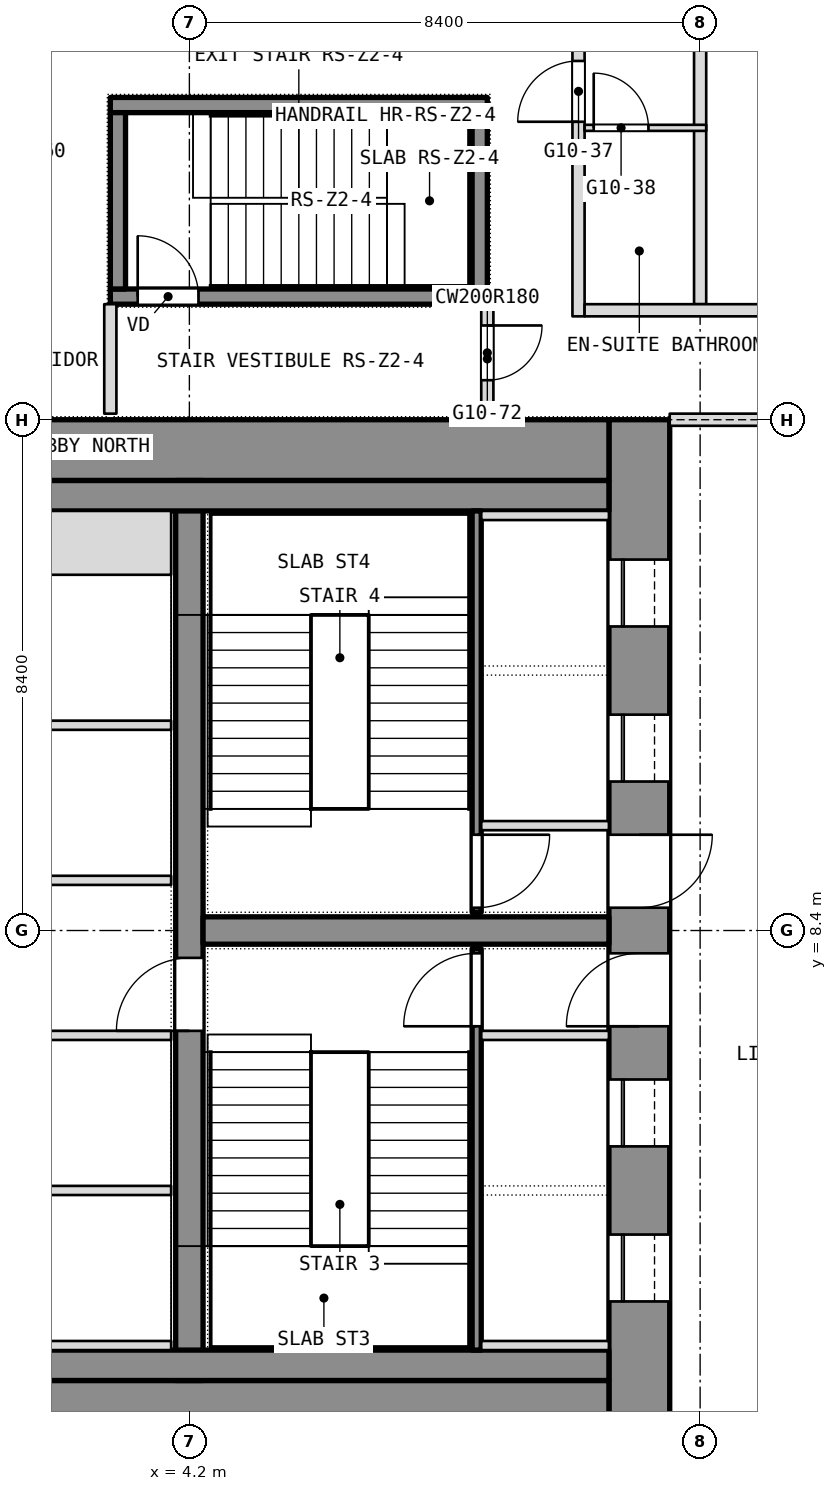
"""IFC4 building model, lengths in metres.
Left out: names, types, materials, properties, quantities, classifications, styles, units other than length and angle.
Written with IfcOpenShell. Run it as: python <this file> out.ifc"""

import sys

from ifc_helpers import new_model, si_unit, direction, frame, frame_2d, origin, place, context, subcontext, project, spatial, rectangle, extrude, element, fill, save


model = new_model("IFC4")
c1 = context("Model", 3, precision=1e-05, world=origin(), true_north=direction((0.0, 1.0)))
c2 = subcontext(c1, "Body", "Model", "MODEL_VIEW")
j1 = project(units=[si_unit("LENGTHUNIT", "METRE"), si_unit("PLANEANGLEUNIT", "RADIAN")], contexts=[c1])
p1 = place(None, origin())
s1 = spatial("IfcSite", under=j1, at=p1, CompositionType="ELEMENT")
p2 = place(p1, origin())
s2 = spatial("IfcBuilding", under=s1, at=p2, CompositionType="ELEMENT")
p3 = place(p2, frame((0.0, 0.0, 126.5)))
s3 = spatial("IfcBuildingStorey", under=s2, at=p3, CompositionType="ELEMENT", Elevation=126.5)
p4 = place(p3, frame((11.6, 0.0, 0.0), z_axis=(0.0, 0.0, 1.0), x_axis=(0.0, 1.0, 0.0)))
e1 = element("IfcWall", 1, at=p4, inside=s3, PredefinedType="SHEAR", context=c2, shape_type="SweptSolid", body=[
    extrude(rectangle(XDim=16.8, YDim=1.0, at=frame_2d((8.4, 0.0))), origin(), (0.0, 0.0, 1.0), 3.6),
])
p5 = place(p4, frame((2.3, 0.0, 0.0)))
e2 = element("IfcOpeningElement", 2, at=p5, cuts=e1, PredefinedType="OPENING", context=c2, shape_type="SweptSolid", body=[
    extrude(rectangle(XDim=1.1, YDim=2.1, at=frame_2d((0.55, 1.05))), frame((0.0, 0.5, 0.0), z_axis=(0.0, -1.0, 0.0), x_axis=(1.0, 0.0, 0.0)), (0.0, 0.0, 1.0), 1.0),
])
p6 = place(p4, frame((4.85, 0.0, 0.0)))
e3 = element("IfcOpeningElement", 3, at=p6, cuts=e1, PredefinedType="OPENING", context=c2, shape_type="SweptSolid", body=[
    extrude(rectangle(XDim=1.1, YDim=2.1, at=frame_2d((0.55, 1.05))), frame((0.0, 0.5, 0.0), z_axis=(0.0, -1.0, 0.0), x_axis=(1.0, 0.0, 0.0)), (0.0, 0.0, 1.0), 1.0),
])
p7 = place(p4, frame((6.825, 0.0, 0.0)))
e4 = element("IfcOpeningElement", 4, at=p7, cuts=e1, PredefinedType="OPENING", context=c2, shape_type="SweptSolid", body=[
    extrude(rectangle(XDim=1.2, YDim=2.1, at=frame_2d((0.6, 1.05))), frame((0.0, 0.5, 0.0), z_axis=(0.0, -1.0, 0.0), x_axis=(1.0, 0.0, 0.0)), (0.0, 0.0, 1.0), 1.0),
])
p8 = place(p4, frame((13.4, 0.0, 0.0)))
e5 = element("IfcOpeningElement", 5, at=p8, cuts=e1, PredefinedType="OPENING", context=c2, shape_type="SweptSolid", body=[
    extrude(rectangle(XDim=1.1, YDim=2.1, at=frame_2d((0.55, 1.05))), frame((0.0, 0.5, 0.0), z_axis=(0.0, -1.0, 0.0), x_axis=(1.0, 0.0, 0.0)), (0.0, 0.0, 1.0), 1.0),
])
p9 = place(p4, frame((10.85, 0.0, 0.0)))
e6 = element("IfcOpeningElement", 6, at=p9, cuts=e1, PredefinedType="OPENING", context=c2, shape_type="SweptSolid", body=[
    extrude(rectangle(XDim=1.1, YDim=2.1, at=frame_2d((0.55, 1.05))), frame((0.0, 0.5, 0.0), z_axis=(0.0, -1.0, 0.0), x_axis=(1.0, 0.0, 0.0)), (0.0, 0.0, 1.0), 1.0),
])
p10 = place(p4, frame((8.775, 0.0, 0.0)))
e7 = element("IfcOpeningElement", 7, at=p10, cuts=e1, PredefinedType="OPENING", context=c2, shape_type="SweptSolid", body=[
    extrude(rectangle(XDim=1.2, YDim=2.1, at=frame_2d((0.6, 1.05))), frame((0.0, 0.5, 0.0), z_axis=(0.0, -1.0, 0.0), x_axis=(1.0, 0.0, 0.0)), (0.0, 0.0, 1.0), 1.0),
])
for number, where, z_axis, x_axis in (
    (8, (-11.1, 0.5, 0.0), (0.0, 0.0, 1.0), (1.0, 0.0, 0.0)),
    (9, (-11.1, 16.3, 0.0), (0.0, 0.0, 1.0), (1.0, 0.0, 0.0)),
):
    element("IfcWall", number, at=place(p3, frame(where, z_axis=z_axis, x_axis=x_axis)), inside=s3, PredefinedType="SHEAR", context=c2, shape_type="SweptSolid", body=[
        extrude(rectangle(XDim=22.2, YDim=1.0, at=frame_2d((11.1, 0.0))), origin(), (0.0, 0.0, 1.0), 3.6),
    ])
p11 = place(p3, frame((4.2, 1.0, 0.0), z_axis=(0.0, 0.0, 1.0), x_axis=(0.0, 1.0, 0.0)))
e10 = element("IfcWall", 10, at=p11, inside=s3, PredefinedType="SHEAR", context=c2, shape_type="SweptSolid", body=[
    extrude(rectangle(XDim=14.8, YDim=0.45, at=frame_2d((7.4, 0.0))), origin(), (0.0, 0.0, 1.0), 3.6),
])
p12 = place(p11, frame((5.75, 0.0, 0.0)))
e11 = element("IfcOpeningElement", 11, at=p12, cuts=e10, PredefinedType="OPENING", context=c2, shape_type="SweptSolid", body=[
    extrude(rectangle(XDim=1.2, YDim=2.1, at=frame_2d((0.6, 1.05))), frame((0.0, 0.225, 0.0), z_axis=(0.0, -1.0, 0.0), x_axis=(1.0, 0.0, 0.0)), (0.0, 0.0, 1.0), 0.45),
])
p13 = place(p3, frame((4.425, 8.4, 0.0), z_axis=(0.0, 0.0, 1.0), x_axis=(1.0, 0.0, 0.0)))
e12 = element("IfcWall", 12, at=p13, inside=s3, PredefinedType="SHEAR", context=c2, shape_type="SweptSolid", body=[
    extrude(rectangle(XDim=6.675, YDim=0.45, at=frame_2d((3.337, 0.0))), origin(), (0.0, 0.0, 1.0), 3.6),
])
p14 = place(p3, frame((12.6, 18.7, 0.0), z_axis=(0.0, 0.0, 1.0), x_axis=(0.0, 1.0, 0.0)))
e13 = element("IfcWall", 13, at=p14, inside=s3, PredefinedType="PARTITIONING", context=c2, shape_type="SweptSolid", body=[
    extrude(rectangle(XDim=9.24, YDim=0.2, at=frame_2d((4.62, 0.0))), origin(), (0.0, 0.0, 1.0), 3.34),
])
p15 = place(p3, frame((10.6, 18.5, 0.0), z_axis=(0.0, 0.0, 1.0), x_axis=(0.0, 1.0, 0.0)))
e14 = element("IfcWall", 14, at=p15, inside=s3, PredefinedType="PARTITIONING", context=c2, shape_type="SweptSolid", body=[
    extrude(rectangle(XDim=5.0, YDim=0.2, at=frame_2d((2.5, 0.0))), origin(), (0.0, 0.0, 1.0), 3.34),
])
p16 = place(p15, frame((3.2, 0.0, 0.0)))
e15 = element("IfcOpeningElement", 15, at=p16, cuts=e14, PredefinedType="OPENING", context=c2, shape_type="SweptSolid", body=[
    extrude(rectangle(XDim=1.0, YDim=2.1, at=frame_2d((0.5, 1.05))), frame((0.0, 0.1, 0.0), z_axis=(0.0, -1.0, 0.0), x_axis=(1.0, 0.0, 0.0)), (0.0, 0.0, 1.0), 0.2),
])
p17 = place(p3, frame((9.1, 16.9, 0.0), z_axis=(0.0, 0.0, 1.0), x_axis=(0.0, 1.0, 0.0)))
e16 = element("IfcWall", 16, at=p17, inside=s3, PredefinedType="PARTITIONING", context=c2, shape_type="SweptSolid", body=[
    extrude(rectangle(XDim=1.8, YDim=0.2, at=frame_2d((0.9, 0.0))), origin(), (0.0, 0.0, 1.0), 3.34),
])
p18 = place(p17, frame((0.55, 0.0, 0.0)))
e17 = element("IfcOpeningElement", 17, at=p18, cuts=e16, PredefinedType="OPENING", context=c2, shape_type="SweptSolid", body=[
    extrude(rectangle(XDim=0.9, YDim=2.1, at=frame_2d((0.45, 1.05))), frame((0.0, 0.1, 0.0), z_axis=(0.0, -1.0, 0.0), x_axis=(1.0, 0.0, 0.0)), (0.0, 0.0, 1.0), 0.2),
])
p19 = place(p3, frame((2.9, 16.9, 0.0), z_axis=(0.0, 0.0, 1.0), x_axis=(0.0, 1.0, 0.0)))
e18 = element("IfcWall", 18, at=p19, inside=s3, PredefinedType="PARTITIONING", context=c2, shape_type="SweptSolid", body=[
    extrude(rectangle(XDim=1.8, YDim=0.2, at=frame_2d((0.9, 0.0))), origin(), (0.0, 0.0, 1.0), 3.34),
])
p20 = place(p3, frame((10.7, 18.6, 0.0), z_axis=(0.0, 0.0, 1.0), x_axis=(1.0, 0.0, 0.0)))
e19 = element("IfcWall", 19, at=p20, inside=s3, PredefinedType="PARTITIONING", context=c2, shape_type="SweptSolid", body=[
    extrude(rectangle(XDim=6.2, YDim=0.2, at=frame_2d((3.1, 0.0))), origin(), (0.0, 0.0, 1.0), 3.34),
])
p21 = place(p20, frame((3.5, 0.0, 0.0)))
e20 = element("IfcOpeningElement", 20, at=p21, cuts=e19, PredefinedType="OPENING", context=c2, shape_type="SweptSolid", body=[
    extrude(rectangle(XDim=1.0, YDim=2.1, at=frame_2d((0.5, 1.05))), frame((0.0, 0.1, 0.0), z_axis=(0.0, -1.0, 0.0), x_axis=(1.0, 0.0, 0.0)), (0.0, 0.0, 1.0), 0.2),
])
p22 = place(p3, frame((10.7, 21.6, 0.0), z_axis=(0.0, 0.0, 1.0), x_axis=(1.0, 0.0, 0.0)))
e21 = element("IfcWall", 21, at=p22, inside=s3, PredefinedType="PARTITIONING", context=c2, shape_type="SweptSolid", body=[
    extrude(rectangle(XDim=2.0, YDim=0.1, at=frame_2d((1.0, 0.0))), origin(), (0.0, 0.0, 1.0), 3.34),
])
p23 = place(p22, frame((0.15, 0.0, 0.0)))
e22 = element("IfcOpeningElement", 22, at=p23, cuts=e21, PredefinedType="OPENING", context=c2, shape_type="SweptSolid", body=[
    extrude(rectangle(XDim=0.9, YDim=2.1, at=frame_2d((0.45, 1.05))), frame((0.0, 0.05, 0.0), z_axis=(0.0, -1.0, 0.0), x_axis=(1.0, 0.0, 0.0)), (0.0, 0.0, 1.0), 0.1),
])
for number, where, z_axis, x_axis in (
    (23, (-11.1, 1.25, 0.0), (0.0, 0.0, 1.0), (1.0, 0.0, 0.0)),
    (24, (-11.1, 15.55, 0.0), (0.0, 0.0, 1.0), (1.0, 0.0, 0.0)),
):
    element("IfcWall", number, at=place(p3, frame(where, z_axis=z_axis, x_axis=x_axis)), inside=s3, PredefinedType="PARTITIONING", context=c2, shape_type="SweptSolid", body=[
        extrude(rectangle(XDim=22.2, YDim=0.5, at=frame_2d((11.1, 0.0))), origin(), (0.0, 0.0, 1.0), 3.34),
    ])
p24 = place(p3, frame((8.925, 1.5, 0.0), z_axis=(0.0, 0.0, 1.0), x_axis=(0.0, 1.0, 0.0)))
e25 = element("IfcWall", 25, at=p24, inside=s3, PredefinedType="SHEAR", context=c2, shape_type="SweptSolid", body=[
    extrude(rectangle(XDim=6.6, YDim=0.15, at=frame_2d((3.3, 0.0))), origin(), (0.0, 0.0, 1.0), 3.34),
])
p25 = place(p24, frame((5.325, 0.0, 0.0)))
e26 = element("IfcOpeningElement", 26, at=p25, cuts=e25, PredefinedType="OPENING", context=c2, shape_type="SweptSolid", body=[
    extrude(rectangle(XDim=1.2, YDim=2.1, at=frame_2d((0.6, 1.05))), frame((0.0, 0.075, 0.0), z_axis=(0.0, -1.0, 0.0), x_axis=(1.0, 0.0, 0.0)), (0.0, 0.0, 1.0), 0.15),
])
for number, where, z_axis, x_axis in (
    (27, (9.0, 6.675, 0.0), (0.0, 0.0, 1.0), (1.0, 0.0, 0.0)),
    (28, (9.0, 1.575, 0.0), (0.0, 0.0, 1.0), (1.0, 0.0, 0.0)),
):
    element("IfcWall", number, at=place(p3, frame(where, z_axis=z_axis, x_axis=x_axis)), inside=s3, PredefinedType="SHEAR", context=c2, shape_type="SweptSolid", body=[
        extrude(rectangle(XDim=2.1, YDim=0.15, at=frame_2d((1.05, 0.0))), origin(), (0.0, 0.0, 1.0), 3.6),
    ])
p26 = place(p3, frame((8.925, 8.7, 0.0), z_axis=(0.0, 0.0, 1.0), x_axis=(0.0, 1.0, 0.0)))
e29 = element("IfcWall", 29, at=p26, inside=s3, PredefinedType="SHEAR", context=c2, shape_type="SweptSolid", body=[
    extrude(rectangle(XDim=6.6, YDim=0.15, at=frame_2d((3.3, 0.0))), origin(), (0.0, 0.0, 1.0), 3.34),
])
p27 = place(p26, frame((0.075, 0.0, 0.0)))
e30 = element("IfcOpeningElement", 30, at=p27, cuts=e29, PredefinedType="OPENING", context=c2, shape_type="SweptSolid", body=[
    extrude(rectangle(XDim=1.2, YDim=2.1, at=frame_2d((0.6, 1.05))), frame((0.0, 0.075, 0.0), z_axis=(0.0, -1.0, 0.0), x_axis=(1.0, 0.0, 0.0)), (0.0, 0.0, 1.0), 0.15),
])
for number, where, z_axis, x_axis in (
    (31, (9.0, 10.125, 0.0), (0.0, 0.0, 1.0), (1.0, 0.0, 0.0)),
    (32, (9.0, 15.225, 0.0), (0.0, 0.0, 1.0), (1.0, 0.0, 0.0)),
):
    element("IfcWall", number, at=place(p3, frame(where, z_axis=z_axis, x_axis=x_axis)), inside=s3, PredefinedType="SHEAR", context=c2, shape_type="SweptSolid", body=[
        extrude(rectangle(XDim=2.1, YDim=0.15, at=frame_2d((1.05, 0.0))), origin(), (0.0, 0.0, 1.0), 3.6),
    ])
p28 = place(p3, frame((-3.9, 4.125, 0.0), z_axis=(0.0, 0.0, 1.0), x_axis=(1.0, 0.0, 0.0)))
e33 = element("IfcWall", 33, at=p28, inside=s3, PredefinedType="PARTITIONING", context=c2, shape_type="SweptSolid", body=[
    extrude(rectangle(XDim=7.8, YDim=0.15, at=frame_2d((3.9, 0.0))), origin(), (0.0, 0.0, 1.0), 3.34),
])
p29 = place(p28, frame((3.75, 0.0, 0.0)))
e34 = element("IfcOpeningElement", 34, at=p29, cuts=e33, PredefinedType="OPENING", context=c2, shape_type="SweptSolid", body=[
    extrude(rectangle(XDim=1.2, YDim=2.1, at=frame_2d((0.6, 1.05))), frame((0.0, 0.075, 0.0), z_axis=(0.0, -1.0, 0.0), x_axis=(1.0, 0.0, 0.0)), (0.0, 0.0, 1.0), 0.15),
])
p30 = place(p3, frame((-3.9, 11.775, 0.0), z_axis=(0.0, 0.0, 1.0), x_axis=(1.0, 0.0, 0.0)))
e35 = element("IfcWall", 35, at=p30, inside=s3, PredefinedType="PARTITIONING", context=c2, shape_type="SweptSolid", body=[
    extrude(rectangle(XDim=7.8, YDim=0.15, at=frame_2d((3.9, 0.0))), origin(), (0.0, 0.0, 1.0), 3.34),
])
p31 = place(p30, frame((3.3, 0.0, 0.0)))
e36 = element("IfcOpeningElement", 36, at=p31, cuts=e35, PredefinedType="OPENING", context=c2, shape_type="SweptSolid", body=[
    extrude(rectangle(XDim=1.2, YDim=2.1, at=frame_2d((0.6, 1.05))), frame((0.0, 0.075, 0.0), z_axis=(0.0, -1.0, 0.0), x_axis=(1.0, 0.0, 0.0)), (0.0, 0.0, 1.0), 0.15),
])
p32 = place(p3, frame((1.65, 1.575, 0.0), z_axis=(0.0, 0.0, 1.0), x_axis=(1.0, 0.0, 0.0)))
e37 = element("IfcWall", 37, at=p32, inside=s3, PredefinedType="SHEAR", context=c2, shape_type="SweptSolid", body=[
    extrude(rectangle(XDim=2.25, YDim=0.15, at=frame_2d((1.125, 0.0))), origin(), (0.0, 0.0, 1.0), 3.6),
])
p33 = place(p3, frame((1.65, 14.775, 0.0), z_axis=(0.0, 0.0, 1.0), x_axis=(1.0, 0.0, 0.0)))
e38 = element("IfcWall", 38, at=p33, inside=s3, PredefinedType="SHEAR", context=c2, shape_type="SweptSolid", body=[
    extrude(rectangle(XDim=2.25, YDim=1.05, at=frame_2d((1.125, 0.0))), origin(), (0.0, 0.0, 1.0), 3.6),
])
for number, where, z_axis, x_axis in (
    (39, (1.65, 6.675, 0.0), (0.0, 0.0, 1.0), (1.0, 0.0, 0.0)),
    (40, (1.65, 9.225, 0.0), (0.0, 0.0, 1.0), (1.0, 0.0, 0.0)),
):
    element("IfcWall", number, at=place(p3, frame(where, z_axis=z_axis, x_axis=x_axis)), inside=s3, PredefinedType="SHEAR", context=c2, shape_type="SweptSolid", body=[
        extrude(rectangle(XDim=2.25, YDim=0.15, at=frame_2d((1.125, 0.0))), origin(), (0.0, 0.0, 1.0), 3.6),
    ])
p34 = place(p3, frame((12.1, 16.8, 0.0), z_axis=(0.0, 0.0, 1.0), x_axis=(1.0, 0.0, 0.0)))
e41 = element("IfcWall", 41, at=p34, inside=s3, PredefinedType="PARTITIONING", context=c2, shape_type="SweptSolid", body=[
    extrude(rectangle(XDim=4.6, YDim=0.2, at=frame_2d((2.3, 0.0))), origin(), (0.0, 0.0, 1.0), 2.89),
])
p35 = place(p3, frame((2.9, 18.825, 0.1), z_axis=(0.0, 0.0, 1.0), x_axis=(1.0, 0.0, 0.0)))
e42 = element("IfcWall", 42, at=p35, inside=s3, PredefinedType="SHEAR", context=c2, shape_type="SweptSolid", body=[
    extrude(rectangle(XDim=6.2, YDim=0.25, at=frame_2d((3.1, 0.0))), origin(), (0.0, 0.0, 1.0), 3.6),
])
p36 = place(p35, frame((0.45, 0.0, 0.0)))
e43 = element("IfcOpeningElement", 43, at=p36, cuts=e42, PredefinedType="OPENING", context=c2, shape_type="SweptSolid", body=[
    extrude(rectangle(XDim=1.0, YDim=2.1, at=frame_2d((0.5, 1.05))), frame((0.0, 0.125, 0.0), z_axis=(0.0, -1.0, 0.0), x_axis=(1.0, 0.0, 0.0)), (0.0, 0.0, 1.0), 0.25),
])
p37 = place(p3, frame((2.9, 21.975, 0.1), z_axis=(0.0, 0.0, 1.0), x_axis=(1.0, 0.0, 0.0)))
e44 = element("IfcWall", 44, at=p37, inside=s3, PredefinedType="SHEAR", context=c2, shape_type="SweptSolid", body=[
    extrude(rectangle(XDim=6.2, YDim=0.25, at=frame_2d((3.1, 0.0))), origin(), (0.0, 0.0, 1.0), 3.6),
])
for number, where, z_axis, x_axis in (
    (45, (3.025, 18.95, 0.1), (0.0, 0.0, 1.0), (0.0, 1.0, 0.0)),
    (46, (8.975, 18.95, 0.1), (0.0, 0.0, 1.0), (0.0, 1.0, 0.0)),
):
    element("IfcWall", number, at=place(p3, frame(where, z_axis=z_axis, x_axis=x_axis)), inside=s3, PredefinedType="SHEAR", context=c2, shape_type="SweptSolid", body=[
        extrude(rectangle(XDim=2.9, YDim=0.25, at=frame_2d((1.45, 0.0))), origin(), (0.0, 0.0, 1.0), 3.6),
    ])
p38 = place(p16, origin())
e47 = element("IfcDoor", 47, at=p38, inside=s3, OperationType="SINGLE_SWING_LEFT", PredefinedType="DOOR", context=c2, shape_type="SweptSolid", body=[
    extrude(rectangle(XDim=1.0, YDim=2.1, at=frame_2d((0.5, 1.05))), frame((0.0, 0.025, 0.0), z_axis=(0.0, -1.0, 0.0), x_axis=(1.0, 0.0, 0.0)), (0.0, 0.0, 1.0), 0.05),
])
fill(e15, e47)
p39 = place(p18, origin())
e48 = element("IfcDoor", 48, at=p39, inside=s3, OperationType="SINGLE_SWING_RIGHT", PredefinedType="DOOR", context=c2, shape_type="SweptSolid", body=[
    extrude(rectangle(XDim=0.9, YDim=2.1, at=frame_2d((0.45, 1.05))), frame((0.0, 0.025, 0.0), z_axis=(0.0, -1.0, 0.0), x_axis=(1.0, 0.0, 0.0)), (0.0, 0.0, 1.0), 0.05),
])
fill(e17, e48)
p40 = place(p23, origin())
e49 = element("IfcDoor", 49, at=p40, inside=s3, OperationType="SINGLE_SWING_RIGHT", PredefinedType="DOOR", context=c2, shape_type="SweptSolid", body=[
    extrude(rectangle(XDim=0.9, YDim=2.1, at=frame_2d((0.45, 1.05))), frame((0.0, 0.025, 0.0), z_axis=(0.0, -1.0, 0.0), x_axis=(1.0, 0.0, 0.0)), (0.0, 0.0, 1.0), 0.05),
])
fill(e22, e49)
p41 = place(p36, origin())
e50 = element("IfcDoor", 50, at=p41, inside=s3, OperationType="SINGLE_SWING_LEFT", PredefinedType="DOOR", context=c2, shape_type="SweptSolid", body=[
    extrude(rectangle(XDim=1.0, YDim=2.1, at=frame_2d((0.5, 1.05))), frame((0.0, 0.025, 0.0), z_axis=(0.0, -1.0, 0.0), x_axis=(1.0, 0.0, 0.0)), (0.0, 0.0, 1.0), 0.05),
])
fill(e43, e50)
p42 = place(p5, origin())
e51 = element("IfcDoor", 51, at=p42, inside=s3, OperationType="SLIDING_TO_LEFT", PredefinedType="DOOR", context=c2, shape_type="SweptSolid", body=[
    extrude(rectangle(XDim=1.1, YDim=2.1, at=frame_2d((0.55, 1.05))), frame((0.0, 0.025, 0.0), z_axis=(0.0, -1.0, 0.0), x_axis=(1.0, 0.0, 0.0)), (0.0, 0.0, 1.0), 0.05),
])
fill(e2, e51)
p43 = place(p6, origin())
e52 = element("IfcDoor", 52, at=p43, inside=s3, OperationType="SLIDING_TO_LEFT", PredefinedType="DOOR", context=c2, shape_type="SweptSolid", body=[
    extrude(rectangle(XDim=1.1, YDim=2.1, at=frame_2d((0.55, 1.05))), frame((0.0, 0.025, 0.0), z_axis=(0.0, -1.0, 0.0), x_axis=(1.0, 0.0, 0.0)), (0.0, 0.0, 1.0), 0.05),
])
fill(e3, e52)
p44 = place(p7, origin())
e53 = element("IfcDoor", 53, at=p44, inside=s3, OperationType="SINGLE_SWING_LEFT", PredefinedType="DOOR", context=c2, shape_type="SweptSolid", body=[
    extrude(rectangle(XDim=1.2, YDim=2.1, at=frame_2d((0.6, 1.05))), frame((0.0, 0.025, 0.0), z_axis=(0.0, -1.0, 0.0), x_axis=(1.0, 0.0, 0.0)), (0.0, 0.0, 1.0), 0.05),
])
fill(e4, e53)
p45 = place(p25, origin())
e54 = element("IfcDoor", 54, at=p45, inside=s3, OperationType="SINGLE_SWING_LEFT", PredefinedType="DOOR", context=c2, shape_type="SweptSolid", body=[
    extrude(rectangle(XDim=1.2, YDim=2.1, at=frame_2d((0.6, 1.05))), frame((0.0, 0.025, 0.0), z_axis=(0.0, -1.0, 0.0), x_axis=(1.0, 0.0, 0.0)), (0.0, 0.0, 1.0), 0.05),
])
fill(e26, e54)
p46 = place(p8, origin())
e55 = element("IfcDoor", 55, at=p46, inside=s3, OperationType="SLIDING_TO_LEFT", PredefinedType="DOOR", context=c2, shape_type="SweptSolid", body=[
    extrude(rectangle(XDim=1.1, YDim=2.1, at=frame_2d((0.55, 1.05))), frame((0.0, 0.025, 0.0), z_axis=(0.0, -1.0, 0.0), x_axis=(1.0, 0.0, 0.0)), (0.0, 0.0, 1.0), 0.05),
])
fill(e5, e55)
p47 = place(p9, origin())
e56 = element("IfcDoor", 56, at=p47, inside=s3, OperationType="SLIDING_TO_LEFT", PredefinedType="DOOR", context=c2, shape_type="SweptSolid", body=[
    extrude(rectangle(XDim=1.1, YDim=2.1, at=frame_2d((0.55, 1.05))), frame((0.0, 0.025, 0.0), z_axis=(0.0, -1.0, 0.0), x_axis=(1.0, 0.0, 0.0)), (0.0, 0.0, 1.0), 0.05),
])
fill(e6, e56)
p48 = place(p10, origin())
e57 = element("IfcDoor", 57, at=p48, inside=s3, OperationType="SINGLE_SWING_LEFT", PredefinedType="DOOR", context=c2, shape_type="SweptSolid", body=[
    extrude(rectangle(XDim=1.2, YDim=2.1, at=frame_2d((0.6, 1.05))), frame((0.0, 0.025, 0.0), z_axis=(0.0, -1.0, 0.0), x_axis=(1.0, 0.0, 0.0)), (0.0, 0.0, 1.0), 0.05),
])
fill(e7, e57)
p49 = place(p27, origin())
e58 = element("IfcDoor", 58, at=p49, inside=s3, OperationType="SINGLE_SWING_LEFT", PredefinedType="DOOR", context=c2, shape_type="SweptSolid", body=[
    extrude(rectangle(XDim=1.2, YDim=2.1, at=frame_2d((0.6, 1.05))), frame((0.0, 0.025, 0.0), z_axis=(0.0, -1.0, 0.0), x_axis=(1.0, 0.0, 0.0)), (0.0, 0.0, 1.0), 0.05),
])
fill(e30, e58)
p50 = place(p12, origin())
e59 = element("IfcDoor", 59, at=p50, inside=s3, OperationType="SINGLE_SWING_LEFT", PredefinedType="DOOR", context=c2, shape_type="SweptSolid", body=[
    extrude(rectangle(XDim=1.2, YDim=2.1, at=frame_2d((0.6, 1.05))), frame((0.0, 0.025, 0.0), z_axis=(0.0, -1.0, 0.0), x_axis=(1.0, 0.0, 0.0)), (0.0, 0.0, 1.0), 0.05),
])
fill(e11, e59)
save(model, sys.argv[1])
